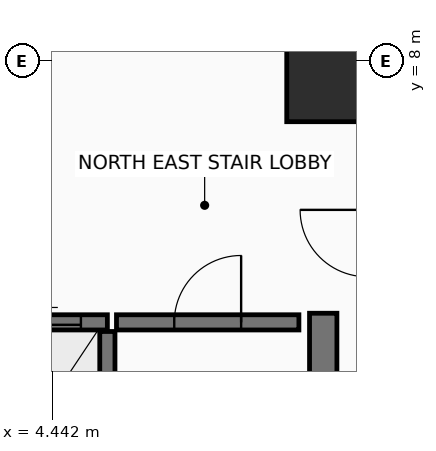
"""IFC4 building model, lengths in metres.
Left out: names, types, materials, properties, quantities, classifications, styles, units other than length and angle.
Written with IfcOpenShell. Run it as: python <this file> out.ifc"""

import sys

from ifc_helpers import new_model, si_unit, direction, frame, frame_2d, origin, origin_2d, place, context, subcontext, project, spatial, rectangle, extrude, element, fill, save


model = new_model("IFC4")
c1 = context("Model", 3, precision=1e-05, world=origin(), true_north=direction((0.0, 1.0)))
c2 = subcontext(c1, "Body", "Model", "MODEL_VIEW")
j1 = project(units=[si_unit("LENGTHUNIT", "METRE"), si_unit("PLANEANGLEUNIT", "RADIAN")], contexts=[c1])
p1 = place(None, origin())
s1 = spatial("IfcSite", under=j1, at=p1, CompositionType="ELEMENT")
p2 = place(p1, origin())
s2 = spatial("IfcBuilding", under=s1, at=p2, CompositionType="ELEMENT")
p3 = place(p2, frame((0.0, 0.0, 181.3)))
s3 = spatial("IfcBuildingStorey", under=s2, at=p3, CompositionType="ELEMENT", Elevation=181.3)
p4 = place(p3, frame((8.9, 7.6, 0.0), z_axis=(0.0, 0.0, 1.0), x_axis=(1.0, 0.0, 0.0)))
e1 = element("IfcColumn", 1, at=p4, inside=s3, PredefinedType="COLUMN", context=c2, shape_type="SweptSolid", body=[
    extrude(rectangle(XDim=1.2, YDim=1.2, at=origin_2d()), origin(), (0.0, 0.0, 1.0), 3.6),
])
p5 = place(p3, frame((8.9, -6.85, 0.0), z_axis=(0.0, 0.0, 1.0), x_axis=(0.0, 1.0, 0.0)))
e2 = element("IfcWall", 2, at=p5, inside=s3, PredefinedType="SHEAR", context=c2, shape_type="SweptSolid", body=[
    extrude(rectangle(XDim=10.7, YDim=0.45, at=frame_2d((5.35, 0.0))), origin(), (0.0, 0.0, 1.0), 3.42),
])
p6 = place(p3, frame((5.35, -3.75, 0.0), z_axis=(0.0, 0.0, 1.0), x_axis=(0.0, 1.0, 0.0)))
e3 = element("IfcWall", 3, at=p6, inside=s3, PredefinedType="SHEAR", context=c2, shape_type="SweptSolid", body=[
    extrude(rectangle(XDim=7.3, YDim=0.25, at=frame_2d((3.65, 0.0))), origin(), (0.0, 0.0, 1.0), 3.42),
])
p7 = place(p3, frame((5.5, 3.7, 0.0), z_axis=(0.0, 0.0, 1.0), x_axis=(1.0, 0.0, 0.0)))
e4 = element("IfcWall", 4, at=p7, inside=s3, PredefinedType="SHEAR", context=c2, shape_type="SweptSolid", body=[
    extrude(rectangle(XDim=3.0, YDim=0.25, at=frame_2d((1.5, 0.0))), origin(), (0.0, 0.0, 1.0), 3.42),
])
p8 = place(p7, frame((0.95, 0.0, 0.0)))
e5 = element("IfcOpeningElement", 5, at=p8, cuts=e4, PredefinedType="OPENING", context=c2, shape_type="SweptSolid", body=[
    extrude(rectangle(XDim=1.1, YDim=2.15, at=frame_2d((0.55, 1.075))), frame((0.0, 0.135, 0.0), z_axis=(0.0, -1.0, 0.0), x_axis=(1.0, 0.0, 0.0)), (0.0, 0.0, 1.0), 0.27),
])
p9 = place(p3, frame((3.28, 3.7, 0.0), z_axis=(0.0, 0.0, 1.0), x_axis=(1.0, 0.0, 0.0)))
e6 = element("IfcWall", 6, at=p9, inside=s3, PredefinedType="SHEAR", context=c2, shape_type="SweptSolid", body=[
    extrude(rectangle(XDim=2.07, YDim=0.25, at=frame_2d((1.035, 0.0))), origin(), (0.0, 0.0, 1.0), 3.42),
])
p10 = place(p9, frame((0.435, 0.0, 0.0)))
e7 = element("IfcOpeningElement", 7, at=p10, cuts=e6, PredefinedType="OPENING", context=c2, shape_type="SweptSolid", body=[
    extrude(rectangle(XDim=1.2, YDim=2.2, at=frame_2d((0.6, 1.1))), frame((0.0, 0.135, 0.0), z_axis=(0.0, -1.0, 0.0), x_axis=(1.0, 0.0, 0.0)), (0.0, 0.0, 1.0), 0.27),
])
p11 = place(p8, frame((1.1, 0.0, 0.0), z_axis=(0.0, 0.0, 1.0), x_axis=(-1.0, 0.0, 0.0)))
e8 = element("IfcDoor", 8, at=p11, inside=s3, OperationType="SINGLE_SWING_LEFT", PredefinedType="DOOR", context=c2, shape_type="SweptSolid", body=[
    extrude(rectangle(XDim=1.1, YDim=2.15, at=frame_2d((0.55, 1.075))), frame((0.0, 0.025, 0.0), z_axis=(0.0, -1.0, 0.0), x_axis=(1.0, 0.0, 0.0)), (0.0, 0.0, 1.0), 0.05),
])
fill(e5, e8)
p12 = place(p10, origin())
e9 = element("IfcDoor", 9, at=p12, inside=s3, OperationType="SLIDING_TO_RIGHT", PredefinedType="DOOR", context=c2, shape_type="SweptSolid", body=[
    extrude(rectangle(XDim=1.2, YDim=2.2, at=frame_2d((0.6, 1.1))), frame((0.0, 0.025, 0.0), z_axis=(0.0, -1.0, 0.0), x_axis=(1.0, 0.0, 0.0)), (0.0, 0.0, 1.0), 0.05),
])
fill(e7, e9)
save(model, sys.argv[1])
